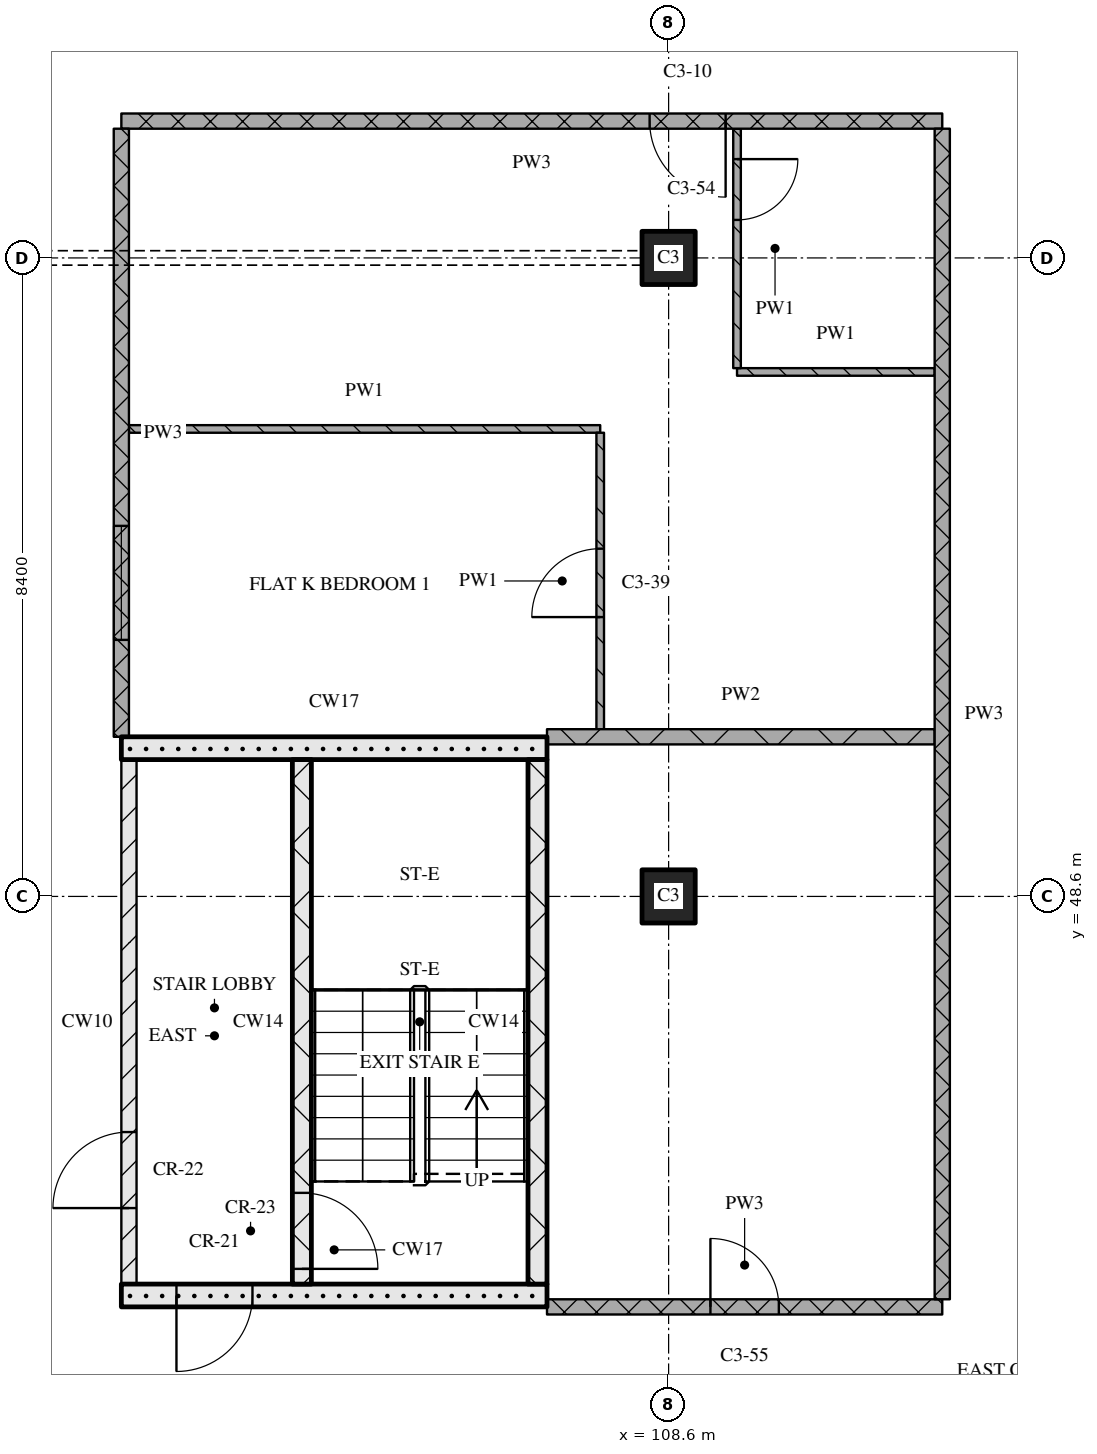
"""IFC4 building model, lengths in metres.
Left out: names, types, materials, properties, quantities, classifications, styles, units other than length and angle.
Written with IfcOpenShell. Run it as: python <this file> out.ifc"""

import sys

from ifc_helpers import new_model, si_unit, direction, frame, frame_2d, origin, origin_2d, place, context, subcontext, project, spatial, rectangle, extrude, element, fill, save


model = new_model("IFC4")
c1 = context("Model", 3, precision=1e-05, world=origin(), true_north=direction((0.0, 1.0)))
c2 = subcontext(c1, "Body", "Model", "MODEL_VIEW")
j1 = project(units=[si_unit("LENGTHUNIT", "METRE"), si_unit("PLANEANGLEUNIT", "RADIAN")], contexts=[c1])
p1 = place(None, origin())
s1 = spatial("IfcSite", under=j1, at=p1, CompositionType="ELEMENT")
p2 = place(p1, origin())
s2 = spatial("IfcBuilding", under=s1, at=p2, CompositionType="ELEMENT")
p3 = place(p2, frame((0.0, 0.0, 169.05)))
s3 = spatial("IfcBuildingStorey", under=s2, at=p3, CompositionType="ELEMENT", Elevation=169.05)
for number, where, z_axis, x_axis in (
    (1, (108.6, 48.6, 0.0), (0.0, 0.0, 1.0), (1.0, 0.0, 0.0)),
    (2, (108.6, 57.0, 0.0), (0.0, 0.0, 1.0), (1.0, 0.0, 0.0)),
):
    element("IfcColumn", number, at=place(p3, frame(where, z_axis=z_axis, x_axis=x_axis)), inside=s3, PredefinedType="COLUMN", context=c2, shape_type="SweptSolid", body=[
        extrude(rectangle(XDim=0.7, YDim=0.7, at=origin_2d()), origin(), (0.0, 0.0, 1.0), 3.6),
    ])
p4 = place(p3, frame((101.4, 43.35, 0.0), z_axis=(0.0, 0.0, 1.0), x_axis=(1.0, 0.0, 0.0)))
e3 = element("IfcWall", 3, at=p4, inside=s3, PredefinedType="SOLIDWALL", context=c2, shape_type="SweptSolid", body=[
    extrude(rectangle(XDim=5.6, YDim=0.3, at=frame_2d((2.8, 0.0))), origin(), (0.0, 0.0, 1.0), 3.32),
])
p5 = place(p4, frame((0.725, 0.0, 0.0)))
e4 = element("IfcOpeningElement", 4, at=p5, cuts=e3, PredefinedType="OPENING", context=c2, shape_type="SweptSolid", body=[
    extrude(rectangle(XDim=1.0, YDim=2.1, at=frame_2d((0.5, 1.05))), frame((0.0, 0.16, 0.0), z_axis=(0.0, -1.0, 0.0), x_axis=(1.0, 0.0, 0.0)), (0.0, 0.0, 1.0), 0.32),
])
p6 = place(p3, frame((101.5, 43.5, 0.0), z_axis=(0.0, 0.0, 1.0), x_axis=(0.0, 1.0, 0.0)))
e5 = element("IfcWall", 5, at=p6, inside=s3, PredefinedType="PARTITIONING", context=c2, shape_type="SweptSolid", body=[
    extrude(rectangle(XDim=6.9, YDim=0.2, at=frame_2d((3.45, 0.0))), origin(), (0.0, 0.0, 1.0), 3.32),
])
p7 = place(p6, frame((1.0, 0.0, 0.0)))
e6 = element("IfcOpeningElement", 6, at=p7, cuts=e5, PredefinedType="OPENING", context=c2, shape_type="SweptSolid", body=[
    extrude(rectangle(XDim=1.0, YDim=2.1, at=frame_2d((0.5, 1.05))), frame((0.0, 0.11, 0.0), z_axis=(0.0, -1.0, 0.0), x_axis=(1.0, 0.0, 0.0)), (0.0, 0.0, 1.0), 0.22),
])
p8 = place(p3, frame((103.775, 43.5, 0.0), z_axis=(0.0, 0.0, 1.0), x_axis=(0.0, 1.0, 0.0)))
e7 = element("IfcWall", 7, at=p8, inside=s3, PredefinedType="SOLIDWALL", context=c2, shape_type="SweptSolid", body=[
    extrude(rectangle(XDim=6.9, YDim=0.25, at=frame_2d((3.45, 0.0))), origin(), (0.0, 0.0, 1.0), 3.32),
])
p9 = place(p8, frame((0.2, 0.0, 0.0)))
e8 = element("IfcOpeningElement", 8, at=p9, cuts=e7, PredefinedType="OPENING", context=c2, shape_type="SweptSolid", body=[
    extrude(rectangle(XDim=1.0, YDim=2.1, at=frame_2d((0.5, 1.05))), frame((0.0, 0.135, 0.0), z_axis=(0.0, -1.0, 0.0), x_axis=(1.0, 0.0, 0.0)), (0.0, 0.0, 1.0), 0.27),
])
p10 = place(p3, frame((106.875, 43.5, 0.0), z_axis=(0.0, 0.0, 1.0), x_axis=(0.0, 1.0, 0.0)))
e9 = element("IfcWall", 9, at=p10, inside=s3, PredefinedType="SOLIDWALL", context=c2, shape_type="SweptSolid", body=[
    extrude(rectangle(XDim=6.9, YDim=0.25, at=frame_2d((3.45, 0.0))), origin(), (0.0, 0.0, 1.0), 3.32),
])
p11 = place(p3, frame((101.4, 50.55, 0.0), z_axis=(0.0, 0.0, 1.0), x_axis=(1.0, 0.0, 0.0)))
e10 = element("IfcWall", 10, at=p11, inside=s3, PredefinedType="SOLIDWALL", context=c2, shape_type="SweptSolid", body=[
    extrude(rectangle(XDim=5.6, YDim=0.3, at=frame_2d((2.8, 0.0))), origin(), (0.0, 0.0, 1.0), 3.32),
])
p12 = place(p3, frame((107.0, 43.2, 0.0), z_axis=(0.0, 0.0, 1.0), x_axis=(1.0, 0.0, 0.0)))
e11 = element("IfcWall", 11, at=p12, inside=s3, PredefinedType="PARTITIONING", context=c2, shape_type="SweptSolid", body=[
    extrude(rectangle(XDim=5.2, YDim=0.2, at=frame_2d((2.6, 0.0))), origin(), (0.0, 0.0, 1.0), 3.32),
])
p13 = place(p12, frame((2.15, 0.0, 0.0)))
e12 = element("IfcOpeningElement", 12, at=p13, cuts=e11, PredefinedType="OPENING", context=c2, shape_type="SweptSolid", body=[
    extrude(rectangle(XDim=0.9, YDim=2.1, at=frame_2d((0.45, 1.05))), frame((0.0, 0.11, 0.0), z_axis=(0.0, -1.0, 0.0), x_axis=(1.0, 0.0, 0.0)), (0.0, 0.0, 1.0), 0.22),
])
p14 = place(p3, frame((107.0, 50.7, 0.0), z_axis=(0.0, 0.0, 1.0), x_axis=(1.0, 0.0, 0.0)))
e13 = element("IfcWall", 13, at=p14, inside=s3, PredefinedType="PARTITIONING", context=c2, shape_type="SweptSolid", body=[
    extrude(rectangle(XDim=5.1, YDim=0.2, at=frame_2d((2.55, 0.0))), origin(), (0.0, 0.0, 1.0), 3.32),
])
p15 = place(p3, frame((101.5, 54.75, 0.0), z_axis=(0.0, 0.0, 1.0), x_axis=(1.0, 0.0, 0.0)))
e14 = element("IfcWall", 14, at=p15, inside=s3, PredefinedType="PARTITIONING", context=c2, shape_type="SweptSolid", body=[
    extrude(rectangle(XDim=6.2, YDim=0.1, at=frame_2d((3.1, 0.0))), origin(), (0.0, 0.0, 1.0), 3.32),
])
p16 = place(p3, frame((109.5, 55.5, 0.0), z_axis=(0.0, 0.0, 1.0), x_axis=(1.0, 0.0, 0.0)))
e15 = element("IfcWall", 15, at=p16, inside=s3, PredefinedType="PARTITIONING", context=c2, shape_type="SweptSolid", body=[
    extrude(rectangle(XDim=2.6, YDim=0.1, at=frame_2d((1.3, 0.0))), origin(), (0.0, 0.0, 1.0), 3.32),
])
p17 = place(p3, frame((112.2, 58.8, 0.0), z_axis=(0.0, 0.0, 1.0), x_axis=(-1.0, 0.0, 0.0)))
e16 = element("IfcWall", 16, at=p17, inside=s3, PredefinedType="PARTITIONING", context=c2, shape_type="SweptSolid", body=[
    extrude(rectangle(XDim=10.8, YDim=0.2, at=frame_2d((5.4, 0.0))), origin(), (0.0, 0.0, 1.0), 3.32),
])
p18 = place(p17, frame((2.85, 0.0, 0.0)))
e17 = element("IfcOpeningElement", 17, at=p18, cuts=e16, PredefinedType="OPENING", context=c2, shape_type="SweptSolid", body=[
    extrude(rectangle(XDim=1.0, YDim=2.1, at=frame_2d((0.5, 1.05))), frame((0.0, 0.11, 0.0), z_axis=(0.0, -1.0, 0.0), x_axis=(1.0, 0.0, 0.0)), (0.0, 0.0, 1.0), 0.22),
])
p19 = place(p3, frame((101.4, 58.7, 0.0), z_axis=(0.0, 0.0, 1.0), x_axis=(0.0, -1.0, 0.0)))
e18 = element("IfcWall", 18, at=p19, inside=s3, PredefinedType="PARTITIONING", context=c2, shape_type="SweptSolid", body=[
    extrude(rectangle(XDim=8.0, YDim=0.2, at=frame_2d((4.0, 0.0))), origin(), (0.0, 0.0, 1.0), 3.32),
])
p20 = place(p19, frame((5.225, 0.0, 0.9)))
e19 = element("IfcOpeningElement", 19, at=p20, cuts=e18, PredefinedType="OPENING", context=c2, shape_type="SweptSolid", body=[
    extrude(rectangle(XDim=1.5, YDim=1.5, at=frame_2d((0.75, 0.75))), frame((0.0, 0.11, 0.0), z_axis=(0.0, -1.0, 0.0), x_axis=(1.0, 0.0, 0.0)), (0.0, 0.0, 1.0), 0.22),
])
p21 = place(p3, frame((107.7, 50.8, 0.0), z_axis=(0.0, 0.0, 1.0), x_axis=(0.0, 1.0, 0.0)))
e20 = element("IfcWall", 20, at=p21, inside=s3, PredefinedType="PARTITIONING", context=c2, shape_type="SweptSolid", body=[
    extrude(rectangle(XDim=3.9, YDim=0.1, at=frame_2d((1.95, 0.0))), origin(), (0.0, 0.0, 1.0), 3.32),
])
p22 = place(p21, frame((1.475, 0.0, 0.0)))
e21 = element("IfcOpeningElement", 21, at=p22, cuts=e20, PredefinedType="OPENING", context=c2, shape_type="SweptSolid", body=[
    extrude(rectangle(XDim=0.9, YDim=2.1, at=frame_2d((0.45, 1.05))), frame((0.0, 0.06, 0.0), z_axis=(0.0, -1.0, 0.0), x_axis=(1.0, 0.0, 0.0)), (0.0, 0.0, 1.0), 0.12),
])
p23 = place(p3, frame((109.5, 58.7, 0.0), z_axis=(0.0, 0.0, 1.0), x_axis=(0.0, -1.0, 0.0)))
e22 = element("IfcWall", 22, at=p23, inside=s3, PredefinedType="PARTITIONING", context=c2, shape_type="SweptSolid", body=[
    extrude(rectangle(XDim=3.15, YDim=0.1, at=frame_2d((1.575, 0.0))), origin(), (0.0, 0.0, 1.0), 3.32),
])
p24 = place(p23, frame((0.4, 0.0, 0.0)))
e23 = element("IfcOpeningElement", 23, at=p24, cuts=e22, PredefinedType="OPENING", context=c2, shape_type="SweptSolid", body=[
    extrude(rectangle(XDim=0.8, YDim=2.1, at=frame_2d((0.4, 1.05))), frame((0.0, 0.06, 0.0), z_axis=(0.0, -1.0, 0.0), x_axis=(1.0, 0.0, 0.0)), (0.0, 0.0, 1.0), 0.12),
])
p25 = place(p3, frame((112.2, 58.7, 0.0), z_axis=(0.0, 0.0, 1.0), x_axis=(0.0, -1.0, 0.0)))
e24 = element("IfcWall", 24, at=p25, inside=s3, PredefinedType="PARTITIONING", context=c2, shape_type="SweptSolid", body=[
    extrude(rectangle(XDim=15.4, YDim=0.2, at=frame_2d((7.7, 0.0))), origin(), (0.0, 0.0, 1.0), 3.32),
])
p26 = place(p5, origin())
e25 = element("IfcDoor", 25, at=p26, inside=s3, OperationType="SINGLE_SWING_RIGHT", PredefinedType="DOOR", context=c2, shape_type="SweptSolid", body=[
    extrude(rectangle(XDim=1.0, YDim=2.1, at=frame_2d((0.5, 1.05))), frame((0.0, 0.025, 0.0), z_axis=(0.0, -1.0, 0.0), x_axis=(1.0, 0.0, 0.0)), (0.0, 0.0, 1.0), 0.05),
])
fill(e4, e25)
p27 = place(p9, origin())
e26 = element("IfcDoor", 26, at=p27, inside=s3, OperationType="SINGLE_SWING_RIGHT", PredefinedType="DOOR", context=c2, shape_type="SweptSolid", body=[
    extrude(rectangle(XDim=1.0, YDim=2.1, at=frame_2d((0.5, 1.05))), frame((0.0, 0.025, 0.0), z_axis=(0.0, -1.0, 0.0), x_axis=(1.0, 0.0, 0.0)), (0.0, 0.0, 1.0), 0.05),
])
fill(e8, e26)
p28 = place(p7, origin())
e27 = element("IfcDoor", 27, at=p28, inside=s3, OperationType="SINGLE_SWING_LEFT", PredefinedType="DOOR", context=c2, shape_type="SweptSolid", body=[
    extrude(rectangle(XDim=1.0, YDim=2.1, at=frame_2d((0.5, 1.05))), frame((0.0, 0.025, 0.0), z_axis=(0.0, -1.0, 0.0), x_axis=(1.0, 0.0, 0.0)), (0.0, 0.0, 1.0), 0.05),
])
fill(e6, e27)
p29 = place(p13, origin())
e28 = element("IfcDoor", 28, at=p29, inside=s3, OperationType="SINGLE_SWING_LEFT", PredefinedType="DOOR", context=c2, shape_type="SweptSolid", body=[
    extrude(rectangle(XDim=0.9, YDim=2.1, at=frame_2d((0.45, 1.05))), frame((0.0, 0.025, 0.0), z_axis=(0.0, -1.0, 0.0), x_axis=(1.0, 0.0, 0.0)), (0.0, 0.0, 1.0), 0.05),
])
fill(e12, e28)
p30 = place(p18, origin())
e29 = element("IfcDoor", 29, at=p30, inside=s3, OperationType="SINGLE_SWING_LEFT", PredefinedType="DOOR", context=c2, shape_type="SweptSolid", body=[
    extrude(rectangle(XDim=1.0, YDim=2.1, at=frame_2d((0.5, 1.05))), frame((0.0, 0.025, 0.0), z_axis=(0.0, -1.0, 0.0), x_axis=(1.0, 0.0, 0.0)), (0.0, 0.0, 1.0), 0.05),
])
fill(e17, e29)
p31 = place(p22, origin())
e30 = element("IfcDoor", 30, at=p31, inside=s3, OperationType="SINGLE_SWING_LEFT", PredefinedType="DOOR", context=c2, shape_type="SweptSolid", body=[
    extrude(rectangle(XDim=0.9, YDim=2.1, at=frame_2d((0.45, 1.05))), frame((0.0, 0.025, 0.0), z_axis=(0.0, -1.0, 0.0), x_axis=(1.0, 0.0, 0.0)), (0.0, 0.0, 1.0), 0.05),
])
fill(e21, e30)
p32 = place(p24, origin())
e31 = element("IfcDoor", 31, at=p32, inside=s3, OperationType="SINGLE_SWING_LEFT", PredefinedType="DOOR", context=c2, shape_type="SweptSolid", body=[
    extrude(rectangle(XDim=0.8, YDim=2.1, at=frame_2d((0.4, 1.05))), frame((0.0, 0.025, 0.0), z_axis=(0.0, -1.0, 0.0), x_axis=(1.0, 0.0, 0.0)), (0.0, 0.0, 1.0), 0.05),
])
fill(e23, e31)
p33 = place(p20, origin())
e32 = element("IfcWindow", 32, at=p33, inside=s3, PartitioningType="SINGLE_PANEL", PredefinedType="WINDOW", context=c2, shape_type="SweptSolid", body=[
    extrude(rectangle(XDim=1.5, YDim=1.5, at=frame_2d((0.75, 0.75))), frame((0.0, 0.03, 0.0), z_axis=(0.0, -1.0, 0.0), x_axis=(1.0, 0.0, 0.0)), (0.0, 0.0, 1.0), 0.06),
])
fill(e19, e32)
save(model, sys.argv[1])
